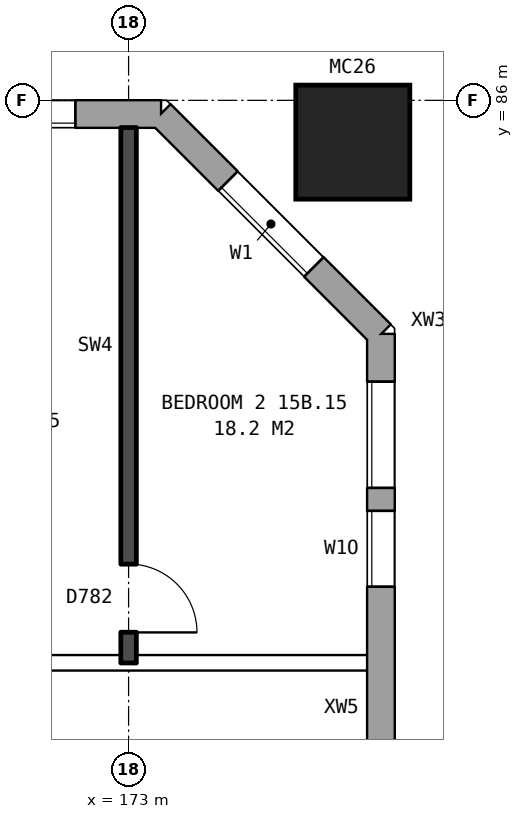
"""IFC4 building model, lengths in metres.
Left out: names, types, materials, properties, quantities, classifications, styles, units other than length and angle.
Written with IfcOpenShell. Run it as: python <this file> out.ifc"""

import sys

from ifc_helpers import new_model, si_unit, direction, frame, frame_2d, origin, origin_2d, place, context, subcontext, project, spatial, rectangle, hollow_rectangle, extrude, element, fill, save


model = new_model("IFC4")
c1 = context("Model", 3, precision=1e-05, world=origin(), true_north=direction((0.0, 1.0)))
c2 = subcontext(c1, "Body", "Model", "MODEL_VIEW")
j1 = project(units=[si_unit("LENGTHUNIT", "METRE"), si_unit("PLANEANGLEUNIT", "RADIAN")], contexts=[c1])
p1 = place(None, origin())
s1 = spatial("IfcSite", under=j1, at=p1, CompositionType="ELEMENT")
p2 = place(p1, origin())
s2 = spatial("IfcBuilding", under=s1, at=p2, CompositionType="ELEMENT")
p3 = place(p2, frame((0.0, 0.0, 56.7)))
s3 = spatial("IfcBuildingStorey", under=s2, at=p3, CompositionType="ELEMENT", Elevation=56.7)
p4 = place(p3, frame((175.95, 85.45, 0.0), z_axis=(0.0, 0.0, 1.0), x_axis=(1.0, 0.0, 0.0)))
e1 = element("IfcColumn", 1, at=p4, inside=s3, PredefinedType="COLUMN", context=c2, shape_type="SweptSolid", body=[
    extrude(hollow_rectangle(XDim=1.5, YDim=1.5, WallThickness=0.08, at=origin_2d()), origin(), (0.0, 0.0, 1.0), 3.1),
])
p5 = place(p3, frame((176.32, 57.075, 0.0), z_axis=(0.0, 0.0, 1.0), x_axis=(0.0, 1.0, 0.0)))
e2 = element("IfcWall", 2, at=p5, inside=s3, PredefinedType="STANDARD", context=c2, shape_type="SweptSolid", body=[
    extrude(rectangle(XDim=25.851, YDim=0.36, at=frame_2d((12.925, 0.0))), origin(), (0.0, 0.0, 1.0), 2.85),
])
p6 = place(p5, frame((0.3, 0.0, 0.8)))
e3 = element("IfcOpeningElement", 3, at=p6, cuts=e2, PredefinedType="OPENING", context=c2, shape_type="SweptSolid", body=[
    extrude(rectangle(XDim=1.4, YDim=1.8, at=frame_2d((0.7, 0.9))), frame((0.0, 0.19, 0.0), z_axis=(0.0, -1.0, 0.0), x_axis=(1.0, 0.0, 0.0)), (0.0, 0.0, 1.0), 0.38),
])
p7 = place(p5, frame((5.525, 0.0, 1.4)))
e4 = element("IfcOpeningElement", 4, at=p7, cuts=e2, PredefinedType="OPENING", context=c2, shape_type="SweptSolid", body=[
    extrude(rectangle(XDim=1.6, YDim=1.2, at=frame_2d((0.8, 0.6))), frame((0.0, 0.19, 0.0), z_axis=(0.0, -1.0, 0.0), x_axis=(1.0, 0.0, 0.0)), (0.0, 0.0, 1.0), 0.38),
])
p8 = place(p5, frame((7.625, 0.0, 0.8)))
e5 = element("IfcOpeningElement", 5, at=p8, cuts=e2, PredefinedType="OPENING", context=c2, shape_type="SweptSolid", body=[
    extrude(rectangle(XDim=1.6, YDim=1.8, at=frame_2d((0.8, 0.9))), frame((0.0, 0.19, 0.0), z_axis=(0.0, -1.0, 0.0), x_axis=(1.0, 0.0, 0.0)), (0.0, 0.0, 1.0), 0.38),
])
p9 = place(p5, frame((10.625, 0.0, 0.8)))
e6 = element("IfcOpeningElement", 6, at=p9, cuts=e2, PredefinedType="OPENING", context=c2, shape_type="SweptSolid", body=[
    extrude(rectangle(XDim=1.6, YDim=1.8, at=frame_2d((0.8, 0.9))), frame((0.0, 0.19, 0.0), z_axis=(0.0, -1.0, 0.0), x_axis=(1.0, 0.0, 0.0)), (0.0, 0.0, 1.0), 0.38),
])
p10 = place(p5, frame((13.625, 0.0, 0.8)))
e7 = element("IfcOpeningElement", 7, at=p10, cuts=e2, PredefinedType="OPENING", context=c2, shape_type="SweptSolid", body=[
    extrude(rectangle(XDim=1.6, YDim=1.8, at=frame_2d((0.8, 0.9))), frame((0.0, 0.19, 0.0), z_axis=(0.0, -1.0, 0.0), x_axis=(1.0, 0.0, 0.0)), (0.0, 0.0, 1.0), 0.38),
])
p11 = place(p5, frame((16.625, 0.0, 0.8)))
e8 = element("IfcOpeningElement", 8, at=p11, cuts=e2, PredefinedType="OPENING", context=c2, shape_type="SweptSolid", body=[
    extrude(rectangle(XDim=1.6, YDim=1.8, at=frame_2d((0.8, 0.9))), frame((0.0, 0.19, 0.0), z_axis=(0.0, -1.0, 0.0), x_axis=(1.0, 0.0, 0.0)), (0.0, 0.0, 1.0), 0.38),
])
p12 = place(p5, frame((9.525, 0.0, 0.8)))
e9 = element("IfcOpeningElement", 9, at=p12, cuts=e2, PredefinedType="OPENING", context=c2, shape_type="SweptSolid", body=[
    extrude(rectangle(XDim=0.8, YDim=1.8, at=frame_2d((0.4, 0.9))), frame((0.0, 0.19, 0.0), z_axis=(0.0, -1.0, 0.0), x_axis=(1.0, 0.0, 0.0)), (0.0, 0.0, 1.0), 0.38),
])
p13 = place(p5, frame((22.525, 0.0, 0.8)))
e10 = element("IfcOpeningElement", 10, at=p13, cuts=e2, PredefinedType="OPENING", context=c2, shape_type="SweptSolid", body=[
    extrude(rectangle(XDim=1.0, YDim=1.2, at=frame_2d((0.5, 0.6))), frame((0.0, 0.19, 0.0), z_axis=(0.0, -1.0, 0.0), x_axis=(1.0, 0.0, 0.0)), (0.0, 0.0, 1.0), 0.38),
])
p14 = place(p5, frame((2.0, 0.0, 0.8)))
e11 = element("IfcOpeningElement", 11, at=p14, cuts=e2, PredefinedType="OPENING", context=c2, shape_type="SweptSolid", body=[
    extrude(rectangle(XDim=0.8, YDim=1.5, at=frame_2d((0.4, 0.75))), frame((0.0, 0.19, 0.0), z_axis=(0.0, -1.0, 0.0), x_axis=(1.0, 0.0, 0.0)), (0.0, 0.0, 1.0), 0.38),
])
p15 = place(p5, frame((12.525, 0.0, 0.8)))
e12 = element("IfcOpeningElement", 12, at=p15, cuts=e2, PredefinedType="OPENING", context=c2, shape_type="SweptSolid", body=[
    extrude(rectangle(XDim=0.8, YDim=1.8, at=frame_2d((0.4, 0.9))), frame((0.0, 0.19, 0.0), z_axis=(0.0, -1.0, 0.0), x_axis=(1.0, 0.0, 0.0)), (0.0, 0.0, 1.0), 0.38),
])
p16 = place(p5, frame((15.525, 0.0, 0.8)))
e13 = element("IfcOpeningElement", 13, at=p16, cuts=e2, PredefinedType="OPENING", context=c2, shape_type="SweptSolid", body=[
    extrude(rectangle(XDim=0.8, YDim=1.8, at=frame_2d((0.4, 0.9))), frame((0.0, 0.19, 0.0), z_axis=(0.0, -1.0, 0.0), x_axis=(1.0, 0.0, 0.0)), (0.0, 0.0, 1.0), 0.38),
])
p17 = place(p5, frame((18.525, 0.0, 0.9)))
e14 = element("IfcOpeningElement", 14, at=p17, cuts=e2, PredefinedType="OPENING", context=c2, shape_type="SweptSolid", body=[
    extrude(rectangle(XDim=0.8, YDim=1.5, at=frame_2d((0.4, 0.75))), frame((0.0, 0.19, 0.0), z_axis=(0.0, -1.0, 0.0), x_axis=(1.0, 0.0, 0.0)), (0.0, 0.0, 1.0), 0.38),
])
p18 = place(p5, frame((23.825, 0.0, 0.8)))
e15 = element("IfcOpeningElement", 15, at=p18, cuts=e2, PredefinedType="OPENING", context=c2, shape_type="SweptSolid", body=[
    extrude(rectangle(XDim=1.4, YDim=1.8, at=frame_2d((0.7, 0.9))), frame((0.0, 0.19, 0.0), z_axis=(0.0, -1.0, 0.0), x_axis=(1.0, 0.0, 0.0)), (0.0, 0.0, 1.0), 0.38),
])
p19 = place(p3, frame((176.32, 82.925, 0.0), z_axis=(0.0, 0.0, 1.0), x_axis=(-0.707106781187, 0.707106781187, 0.0)))
e16 = element("IfcWall", 16, at=p19, inside=s3, PredefinedType="STANDARD", context=c2, shape_type="SweptSolid", body=[
    extrude(rectangle(XDim=4.094, YDim=0.36, at=frame_2d((2.047, 0.0))), origin(), (0.0, 0.0, 1.0), 2.85),
])
p20 = place(p19, frame((1.247, 0.0, 0.8)))
e17 = element("IfcOpeningElement", 17, at=p20, cuts=e16, PredefinedType="OPENING", context=c2, shape_type="SweptSolid", body=[
    extrude(rectangle(XDim=1.6, YDim=1.8, at=frame_2d((0.8, 0.9))), frame((0.0, 0.19, 0.0), z_axis=(0.0, -1.0, 0.0), x_axis=(1.0, 0.0, 0.0)), (0.0, 0.0, 1.0), 0.38),
])
p21 = place(p3, frame((173.425, 85.82, 0.0), z_axis=(0.0, 0.0, 1.0), x_axis=(-1.0, 0.0, 0.0)))
e18 = element("IfcWall", 18, at=p21, inside=s3, PredefinedType="STANDARD", context=c2, shape_type="SweptSolid", body=[
    extrude(rectangle(XDim=39.351, YDim=0.36, at=frame_2d((19.675, 0.0))), origin(), (0.0, 0.0, 1.0), 2.85),
])
p22 = place(p21, frame((1.125, 0.0, 0.8)))
e19 = element("IfcOpeningElement", 19, at=p22, cuts=e18, PredefinedType="OPENING", context=c2, shape_type="SweptSolid", body=[
    extrude(rectangle(XDim=1.6, YDim=1.8, at=frame_2d((0.8, 0.9))), frame((0.0, 0.19, 0.0), z_axis=(0.0, -1.0, 0.0), x_axis=(1.0, 0.0, 0.0)), (0.0, 0.0, 1.0), 0.38),
])
p23 = place(p21, frame((4.125, 0.0, 0.8)))
e20 = element("IfcOpeningElement", 20, at=p23, cuts=e18, PredefinedType="OPENING", context=c2, shape_type="SweptSolid", body=[
    extrude(rectangle(XDim=1.6, YDim=1.8, at=frame_2d((0.8, 0.9))), frame((0.0, 0.19, 0.0), z_axis=(0.0, -1.0, 0.0), x_axis=(1.0, 0.0, 0.0)), (0.0, 0.0, 1.0), 0.38),
])
p24 = place(p21, frame((7.125, 0.0, 0.8)))
e21 = element("IfcOpeningElement", 21, at=p24, cuts=e18, PredefinedType="OPENING", context=c2, shape_type="SweptSolid", body=[
    extrude(rectangle(XDim=1.6, YDim=1.8, at=frame_2d((0.8, 0.9))), frame((0.0, 0.19, 0.0), z_axis=(0.0, -1.0, 0.0), x_axis=(1.0, 0.0, 0.0)), (0.0, 0.0, 1.0), 0.38),
])
p25 = place(p21, frame((10.125, 0.0, 0.8)))
e22 = element("IfcOpeningElement", 22, at=p25, cuts=e18, PredefinedType="OPENING", context=c2, shape_type="SweptSolid", body=[
    extrude(rectangle(XDim=1.6, YDim=1.8, at=frame_2d((0.8, 0.9))), frame((0.0, 0.19, 0.0), z_axis=(0.0, -1.0, 0.0), x_axis=(1.0, 0.0, 0.0)), (0.0, 0.0, 1.0), 0.38),
])
p26 = place(p21, frame((12.625, 0.0, 1.25)))
e23 = element("IfcOpeningElement", 23, at=p26, cuts=e18, PredefinedType="OPENING", context=c2, shape_type="SweptSolid", body=[
    extrude(rectangle(XDim=0.8, YDim=1.2, at=frame_2d((0.4, 0.6))), frame((0.0, 0.19, 0.0), z_axis=(0.0, -1.0, 0.0), x_axis=(1.0, 0.0, 0.0)), (0.0, 0.0, 1.0), 0.38),
])
p27 = place(p21, frame((16.125, 0.0, 0.8)))
e24 = element("IfcOpeningElement", 24, at=p27, cuts=e18, PredefinedType="OPENING", context=c2, shape_type="SweptSolid", body=[
    extrude(rectangle(XDim=1.6, YDim=1.8, at=frame_2d((0.8, 0.9))), frame((0.0, 0.19, 0.0), z_axis=(0.0, -1.0, 0.0), x_axis=(1.0, 0.0, 0.0)), (0.0, 0.0, 1.0), 0.38),
])
p28 = place(p21, frame((19.125, 0.0, 0.8)))
e25 = element("IfcOpeningElement", 25, at=p28, cuts=e18, PredefinedType="OPENING", context=c2, shape_type="SweptSolid", body=[
    extrude(rectangle(XDim=1.6, YDim=1.8, at=frame_2d((0.8, 0.9))), frame((0.0, 0.19, 0.0), z_axis=(0.0, -1.0, 0.0), x_axis=(1.0, 0.0, 0.0)), (0.0, 0.0, 1.0), 0.38),
])
p29 = place(p21, frame((21.575, 0.0, 0.8)))
e26 = element("IfcOpeningElement", 26, at=p29, cuts=e18, PredefinedType="OPENING", context=c2, shape_type="SweptSolid", body=[
    extrude(rectangle(XDim=1.4, YDim=1.8, at=frame_2d((0.7, 0.9))), frame((0.0, 0.19, 0.0), z_axis=(0.0, -1.0, 0.0), x_axis=(1.0, 0.0, 0.0)), (0.0, 0.0, 1.0), 0.38),
])
p30 = place(p21, frame((25.275, 0.0, 1.7)))
e27 = element("IfcOpeningElement", 27, at=p30, cuts=e18, PredefinedType="OPENING", context=c2, shape_type="SweptSolid", body=[
    extrude(rectangle(XDim=0.8, YDim=0.9, at=frame_2d((0.4, 0.45))), frame((0.0, 0.19, 0.0), z_axis=(0.0, -1.0, 0.0), x_axis=(1.0, 0.0, 0.0)), (0.0, 0.0, 1.0), 0.38),
])
p31 = place(p21, frame((28.125, 0.0, 0.8)))
e28 = element("IfcOpeningElement", 28, at=p31, cuts=e18, PredefinedType="OPENING", context=c2, shape_type="SweptSolid", body=[
    extrude(rectangle(XDim=1.6, YDim=1.8, at=frame_2d((0.8, 0.9))), frame((0.0, 0.19, 0.0), z_axis=(0.0, -1.0, 0.0), x_axis=(1.0, 0.0, 0.0)), (0.0, 0.0, 1.0), 0.38),
])
p32 = place(p21, frame((31.125, 0.0, 0.8)))
e29 = element("IfcOpeningElement", 29, at=p32, cuts=e18, PredefinedType="OPENING", context=c2, shape_type="SweptSolid", body=[
    extrude(rectangle(XDim=1.6, YDim=1.8, at=frame_2d((0.8, 0.9))), frame((0.0, 0.19, 0.0), z_axis=(0.0, -1.0, 0.0), x_axis=(1.0, 0.0, 0.0)), (0.0, 0.0, 1.0), 0.38),
])
p33 = place(p21, frame((34.125, 0.0, 0.8)))
e30 = element("IfcOpeningElement", 30, at=p33, cuts=e18, PredefinedType="OPENING", context=c2, shape_type="SweptSolid", body=[
    extrude(rectangle(XDim=1.6, YDim=1.8, at=frame_2d((0.8, 0.9))), frame((0.0, 0.19, 0.0), z_axis=(0.0, -1.0, 0.0), x_axis=(1.0, 0.0, 0.0)), (0.0, 0.0, 1.0), 0.38),
])
p34 = place(p21, frame((37.125, 0.0, 0.8)))
e31 = element("IfcOpeningElement", 31, at=p34, cuts=e18, PredefinedType="OPENING", context=c2, shape_type="SweptSolid", body=[
    extrude(rectangle(XDim=1.6, YDim=1.8, at=frame_2d((0.8, 0.9))), frame((0.0, 0.19, 0.0), z_axis=(0.0, -1.0, 0.0), x_axis=(1.0, 0.0, 0.0)), (0.0, 0.0, 1.0), 0.38),
])
p35 = place(p21, frame((15.125, 0.0, 0.65)))
e32 = element("IfcOpeningElement", 32, at=p35, cuts=e18, PredefinedType="OPENING", context=c2, shape_type="SweptSolid", body=[
    extrude(rectangle(XDim=0.6, YDim=0.9, at=frame_2d((0.3, 0.45))), frame((0.0, 0.19, 0.0), z_axis=(0.0, -1.0, 0.0), x_axis=(1.0, 0.0, 0.0)), (0.0, 0.0, 1.0), 0.38),
])
p36 = place(p21, frame((23.275, 0.0, 0.8)))
e33 = element("IfcOpeningElement", 33, at=p36, cuts=e18, PredefinedType="OPENING", context=c2, shape_type="SweptSolid", body=[
    extrude(rectangle(XDim=0.8, YDim=0.9, at=frame_2d((0.4, 0.45))), frame((0.0, 0.19, 0.0), z_axis=(0.0, -1.0, 0.0), x_axis=(1.0, 0.0, 0.0)), (0.0, 0.0, 1.0), 0.38),
])
p37 = place(p21, frame((26.375, 0.0, 0.8)))
e34 = element("IfcOpeningElement", 34, at=p37, cuts=e18, PredefinedType="OPENING", context=c2, shape_type="SweptSolid", body=[
    extrude(rectangle(XDim=0.8, YDim=1.8, at=frame_2d((0.4, 0.9))), frame((0.0, 0.19, 0.0), z_axis=(0.0, -1.0, 0.0), x_axis=(1.0, 0.0, 0.0)), (0.0, 0.0, 1.0), 0.38),
])
p38 = place(p3, frame((155.1, 78.6, 0.0), z_axis=(0.0, 0.0, 1.0), x_axis=(1.0, 0.0, 0.0)))
e35 = element("IfcWall", 35, at=p38, inside=s3, PredefinedType="PARTITIONING", context=c2, shape_type="SweptSolid", body=[
    extrude(rectangle(XDim=21.04, YDim=0.2, at=frame_2d((10.52, 0.0))), origin(), (0.0, 0.0, 1.0), 2.85),
])
p39 = place(p38, frame((2.45, 0.0, 0.0)))
e36 = element("IfcOpeningElement", 36, at=p39, cuts=e35, PredefinedType="OPENING", context=c2, shape_type="SweptSolid", body=[
    extrude(rectangle(XDim=1.0, YDim=2.1, at=frame_2d((0.5, 1.05))), frame((0.0, 0.11, 0.0), z_axis=(0.0, -1.0, 0.0), x_axis=(1.0, 0.0, 0.0)), (0.0, 0.0, 1.0), 0.22),
])
p40 = place(p38, frame((14.4, 0.0, 0.0)))
e37 = element("IfcOpeningElement", 37, at=p40, cuts=e35, PredefinedType="OPENING", context=c2, shape_type="SweptSolid", body=[
    extrude(rectangle(XDim=1.0, YDim=2.1, at=frame_2d((0.5, 1.05))), frame((0.0, 0.11, 0.0), z_axis=(0.0, -1.0, 0.0), x_axis=(1.0, 0.0, 0.0)), (0.0, 0.0, 1.0), 0.22),
])
p41 = place(p3, frame((173.0, 78.6, 0.0), z_axis=(0.0, 0.0, 1.0), x_axis=(0.0, 1.0, 0.0)))
e38 = element("IfcWall", 38, at=p41, inside=s3, PredefinedType="SOLIDWALL", context=c2, shape_type="SweptSolid", body=[
    extrude(rectangle(XDim=7.04, YDim=0.2, at=frame_2d((3.52, 0.0))), origin(), (0.0, 0.0, 1.0), 2.85),
])
p42 = place(p41, frame((0.4, 0.0, 0.0)))
e39 = element("IfcOpeningElement", 39, at=p42, cuts=e38, PredefinedType="OPENING", context=c2, shape_type="SweptSolid", body=[
    extrude(rectangle(XDim=0.9, YDim=2.1, at=frame_2d((0.45, 1.05))), frame((0.0, 0.11, 0.0), z_axis=(0.0, -1.0, 0.0), x_axis=(1.0, 0.0, 0.0)), (0.0, 0.0, 1.0), 0.22),
])
p43 = place(p13, origin())
e40 = element("IfcWindow", 40, at=p43, inside=s3, PartitioningType="SINGLE_PANEL", PredefinedType="WINDOW", context=c2, shape_type="SweptSolid", body=[
    extrude(rectangle(XDim=1.0, YDim=1.2, at=frame_2d((0.5, 0.6))), frame((0.0, 0.15, 0.0), z_axis=(0.0, -1.0, 0.0), x_axis=(1.0, 0.0, 0.0)), (0.0, 0.0, 1.0), 0.06),
])
fill(e10, e40)
p44 = place(p20, origin())
e41 = element("IfcWindow", 41, at=p44, inside=s3, PartitioningType="SINGLE_PANEL", PredefinedType="WINDOW", context=c2, shape_type="SweptSolid", body=[
    extrude(rectangle(XDim=1.6, YDim=1.8, at=frame_2d((0.8, 0.9))), frame((0.0, 0.15, 0.0), z_axis=(0.0, -1.0, 0.0), x_axis=(1.0, 0.0, 0.0)), (0.0, 0.0, 1.0), 0.06),
])
fill(e17, e41)
p45 = place(p22, origin())
e42 = element("IfcWindow", 42, at=p45, inside=s3, PartitioningType="SINGLE_PANEL", PredefinedType="WINDOW", context=c2, shape_type="SweptSolid", body=[
    extrude(rectangle(XDim=1.6, YDim=1.8, at=frame_2d((0.8, 0.9))), frame((0.0, 0.15, 0.0), z_axis=(0.0, -1.0, 0.0), x_axis=(1.0, 0.0, 0.0)), (0.0, 0.0, 1.0), 0.06),
])
fill(e19, e42)
p46 = place(p42, frame((0.9, 0.0, 0.0), z_axis=(0.0, 0.0, 1.0), x_axis=(-1.0, 0.0, 0.0)))
e43 = element("IfcDoor", 43, at=p46, inside=s3, OperationType="SINGLE_SWING_RIGHT", PredefinedType="DOOR", context=c2, shape_type="SweptSolid", body=[
    extrude(rectangle(XDim=0.9, YDim=2.1, at=frame_2d((0.45, 1.05))), frame((0.0, 0.025, 0.0), z_axis=(0.0, -1.0, 0.0), x_axis=(1.0, 0.0, 0.0)), (0.0, 0.0, 1.0), 0.05),
])
fill(e39, e43)
p47 = place(p18, origin())
e44 = element("IfcWindow", 44, at=p47, inside=s3, PartitioningType="SINGLE_PANEL", PredefinedType="WINDOW", context=c2, shape_type="SweptSolid", body=[
    extrude(rectangle(XDim=1.4, YDim=1.8, at=frame_2d((0.7, 0.9))), frame((0.0, 0.15, 0.0), z_axis=(0.0, -1.0, 0.0), x_axis=(1.0, 0.0, 0.0)), (0.0, 0.0, 1.0), 0.06),
])
fill(e15, e44)
save(model, sys.argv[1])
